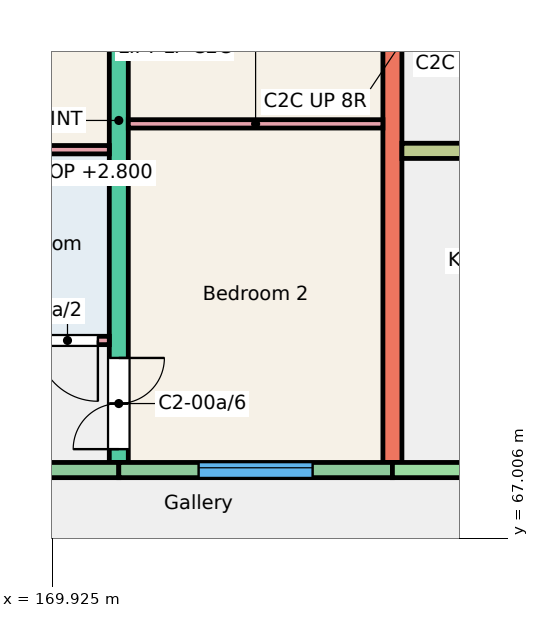
"""IFC4 building model, lengths in metres.
Left out: names, types, materials, properties, quantities, classifications, styles, units other than length and angle.
Written with IfcOpenShell. Run it as: python <this file> out.ifc"""

import sys

from ifc_helpers import new_model, si_unit, direction, frame, frame_2d, origin, place, context, subcontext, project, spatial, rectangle, extrude, element, fill, save


model = new_model("IFC4")
c1 = context("Model", 3, precision=1e-05, world=origin(), true_north=direction((0.0, 1.0)))
c2 = subcontext(c1, "Body", "Model", "MODEL_VIEW")
j1 = project(units=[si_unit("LENGTHUNIT", "METRE"), si_unit("PLANEANGLEUNIT", "RADIAN")], contexts=[c1])
p1 = place(None, origin())
s1 = spatial("IfcSite", under=j1, at=p1, CompositionType="ELEMENT")
p2 = place(p1, origin())
s2 = spatial("IfcBuilding", under=s1, at=p2, CompositionType="ELEMENT")
p3 = place(p2, origin())
s3 = spatial("IfcBuildingStorey", under=s2, at=p3, CompositionType="ELEMENT", Elevation=0.0)
p4 = place(p3, frame((170.8, 68.0, -0.25), z_axis=(0.0, 0.0, 1.0), x_axis=(0.0, 1.0, 0.0)))
e1 = element("IfcWall", 1, at=p4, inside=s3, PredefinedType="SHEAR", context=c2, shape_type="SweptSolid", body=[
    extrude(rectangle(XDim=9.0, YDim=0.25, at=frame_2d((4.5, 0.0))), origin(), (0.0, 0.0, 1.0), 3.25),
])
p5 = place(p4, frame((0.175, 0.0, 0.25)))
e2 = element("IfcOpeningElement", 2, at=p5, cuts=e1, PredefinedType="OPENING", context=c2, shape_type="SweptSolid", body=[
    extrude(rectangle(XDim=1.2, YDim=2.1, at=frame_2d((0.6, 1.05))), frame((0.0, 0.135, 0.0), z_axis=(0.0, -1.0, 0.0), x_axis=(1.0, 0.0, 0.0)), (0.0, 0.0, 1.0), 0.27),
])
p6 = place(p4, frame((6.4, 0.0, 0.25)))
e3 = element("IfcOpeningElement", 3, at=p6, cuts=e1, PredefinedType="OPENING", context=c2, shape_type="SweptSolid", body=[
    extrude(rectangle(XDim=1.2, YDim=2.1, at=frame_2d((0.6, 1.05))), frame((0.0, 0.135, 0.0), z_axis=(0.0, -1.0, 0.0), x_axis=(1.0, 0.0, 0.0)), (0.0, 0.0, 1.0), 0.27),
])
p7 = place(p3, frame((174.4, 68.0, -0.25), z_axis=(0.0, 0.0, 1.0), x_axis=(0.0, 1.0, 0.0)))
e4 = element("IfcWall", 4, at=p7, inside=s3, PredefinedType="SHEAR", context=c2, shape_type="SweptSolid", body=[
    extrude(rectangle(XDim=9.0, YDim=0.25, at=frame_2d((4.5, 0.0))), origin(), (0.0, 0.0, 1.0), 3.25),
])
p8 = place(p3, frame((167.2, 67.9, -0.25), z_axis=(0.0, 0.0, 1.0), x_axis=(1.0, 0.0, 0.0)))
e5 = element("IfcWall", 5, at=p8, inside=s3, PredefinedType="SOLIDWALL", context=c2, shape_type="SweptSolid", body=[
    extrude(rectangle(XDim=3.6, YDim=0.2, at=frame_2d((1.8, 0.0))), origin(), (0.0, 0.0, 1.0), 3.25),
])
p9 = place(p8, frame((1.288, 0.0, 0.25)))
e6 = element("IfcOpeningElement", 6, at=p9, cuts=e5, PredefinedType="OPENING", context=c2, shape_type="SweptSolid", body=[
    extrude(rectangle(XDim=1.0, YDim=2.1, at=frame_2d((0.5, 1.05))), frame((0.0, 0.11, 0.0), z_axis=(0.0, -1.0, 0.0), x_axis=(1.0, 0.0, 0.0)), (0.0, 0.0, 1.0), 0.22),
])
p10 = place(p3, frame((170.8, 67.9, -0.25), z_axis=(0.0, 0.0, 1.0), x_axis=(1.0, 0.0, 0.0)))
e7 = element("IfcWall", 7, at=p10, inside=s3, PredefinedType="SOLIDWALL", context=c2, shape_type="SweptSolid", body=[
    extrude(rectangle(XDim=3.6, YDim=0.2, at=frame_2d((1.8, 0.0))), origin(), (0.0, 0.0, 1.0), 3.25),
])
p11 = place(p10, frame((1.05, 0.0, 1.15)))
e8 = element("IfcOpeningElement", 8, at=p11, cuts=e7, PredefinedType="OPENING", context=c2, shape_type="SweptSolid", body=[
    extrude(rectangle(XDim=1.5, YDim=1.5, at=frame_2d((0.75, 0.75))), frame((0.0, 0.11, 0.0), z_axis=(0.0, -1.0, 0.0), x_axis=(1.0, 0.0, 0.0)), (0.0, 0.0, 1.0), 0.22),
])
p12 = place(p3, frame((174.4, 67.9, -0.25), z_axis=(0.0, 0.0, 1.0), x_axis=(1.0, 0.0, 0.0)))
e9 = element("IfcWall", 9, at=p12, inside=s3, PredefinedType="SHEAR", context=c2, shape_type="SweptSolid", body=[
    extrude(rectangle(XDim=5.85, YDim=0.2, at=frame_2d((2.925, 0.0))), origin(), (0.0, 0.0, 1.0), 3.25),
])
p13 = place(p12, frame((2.438, 0.0, 0.25)))
e10 = element("IfcOpeningElement", 10, at=p13, cuts=e9, PredefinedType="OPENING", context=c2, shape_type="SweptSolid", body=[
    extrude(rectangle(XDim=1.1, YDim=2.1, at=frame_2d((0.55, 1.05))), frame((0.0, 0.11, 0.0), z_axis=(0.0, -1.0, 0.0), x_axis=(1.0, 0.0, 0.0)), (0.0, 0.0, 1.0), 0.22),
])
p14 = place(p3, frame((174.525, 72.1, -0.25), z_axis=(0.0, 0.0, 1.0), x_axis=(1.0, 0.0, 0.0)))
e11 = element("IfcWall", 11, at=p14, inside=s3, PredefinedType="SHEAR", context=c2, shape_type="SweptSolid", body=[
    extrude(rectangle(XDim=5.725, YDim=0.2, at=frame_2d((2.863, 0.0))), origin(), (0.0, 0.0, 1.0), 3.25),
])
p15 = place(p14, frame((0.95, 0.0, 0.25)))
e12 = element("IfcOpeningElement", 12, at=p15, cuts=e11, PredefinedType="OPENING", context=c2, shape_type="SweptSolid", body=[
    extrude(rectangle(XDim=1.0, YDim=2.1, at=frame_2d((0.5, 1.05))), frame((0.0, 0.11, 0.0), z_axis=(0.0, -1.0, 0.0), x_axis=(1.0, 0.0, 0.0)), (0.0, 0.0, 1.0), 0.22),
])
p16 = place(p14, frame((3.863, 0.0, 0.25)))
e13 = element("IfcOpeningElement", 13, at=p16, cuts=e11, PredefinedType="OPENING", context=c2, shape_type="SweptSolid", body=[
    extrude(rectangle(XDim=1.1, YDim=2.1, at=frame_2d((0.55, 1.05))), frame((0.0, 0.11, 0.0), z_axis=(0.0, -1.0, 0.0), x_axis=(1.0, 0.0, 0.0)), (0.0, 0.0, 1.0), 0.22),
])
p17 = place(p3, frame((168.6, 69.605, 0.0), z_axis=(0.0, 0.0, 1.0), x_axis=(1.0, 0.0, 0.0)))
e14 = element("IfcWall", 14, at=p17, inside=s3, PredefinedType="PARTITIONING", context=c2, shape_type="SweptSolid", body=[
    extrude(rectangle(XDim=2.075, YDim=0.11, at=frame_2d((1.038, 0.0))), origin(), (0.0, 0.0, 1.0), 2.8),
])
p18 = place(p17, frame((1.125, 0.0, 0.0)))
e15 = element("IfcOpeningElement", 15, at=p18, cuts=e14, PredefinedType="OPENING", context=c2, shape_type="SweptSolid", body=[
    extrude(rectangle(XDim=0.8, YDim=2.1, at=frame_2d((0.4, 1.05))), frame((0.0, 0.065, 0.0), z_axis=(0.0, -1.0, 0.0), x_axis=(1.0, 0.0, 0.0)), (0.0, 0.0, 1.0), 0.13),
])
p19 = place(p3, frame((167.3, 72.115, 0.0), z_axis=(0.0, 0.0, 1.0), x_axis=(1.0, 0.0, 0.0)))
e16 = element("IfcWall", 16, at=p19, inside=s3, PredefinedType="PARTITIONING", context=c2, shape_type="SweptSolid", body=[
    extrude(rectangle(XDim=3.375, YDim=0.11, at=frame_2d((1.688, 0.0))), origin(), (0.0, 0.0, 1.0), 2.8),
])
p20 = place(p19, frame((0.2, 0.0, 0.0)))
e17 = element("IfcOpeningElement", 17, at=p20, cuts=e16, PredefinedType="OPENING", context=c2, shape_type="SweptSolid", body=[
    extrude(rectangle(XDim=0.9, YDim=2.1, at=frame_2d((0.45, 1.05))), frame((0.0, 0.065, 0.0), z_axis=(0.0, -1.0, 0.0), x_axis=(1.0, 0.0, 0.0)), (0.0, 0.0, 1.0), 0.13),
])
p21 = place(p3, frame((170.925, 72.455, 0.0), z_axis=(0.0, 0.0, 1.0), x_axis=(1.0, 0.0, 0.0)))
e18 = element("IfcWall", 18, at=p21, inside=s3, PredefinedType="PARTITIONING", context=c2, shape_type="SweptSolid", body=[
    extrude(rectangle(XDim=3.35, YDim=0.11, at=frame_2d((1.675, 0.0))), origin(), (0.0, 0.0, 1.0), 2.8),
])
p22 = place(p11, origin())
e19 = element("IfcWindow", 19, at=p22, inside=s3, PartitioningType="SINGLE_PANEL", PredefinedType="WINDOW", context=c2, shape_type="SweptSolid", body=[
    extrude(rectangle(XDim=1.5, YDim=1.5, at=frame_2d((0.75, 0.75))), frame((0.0, 0.06, 0.0), z_axis=(0.0, -1.0, 0.0), x_axis=(1.0, 0.0, 0.0)), (0.0, 0.0, 1.0), 0.06),
])
fill(e8, e19)
p23 = place(p18, origin())
e20 = element("IfcDoor", 20, at=p23, inside=s3, OperationType="SINGLE_SWING_RIGHT", PredefinedType="DOOR", context=c2, shape_type="SweptSolid", body=[
    extrude(rectangle(XDim=0.8, YDim=2.1, at=frame_2d((0.4, 1.05))), frame((0.0, 0.025, 0.0), z_axis=(0.0, -1.0, 0.0), x_axis=(1.0, 0.0, 0.0)), (0.0, 0.0, 1.0), 0.05),
])
fill(e15, e20)
p24 = place(p5, origin())
e21 = element("IfcDoor", 21, at=p24, inside=s3, OperationType="DOUBLE_DOOR_SINGLE_SWING", PredefinedType="DOOR", context=c2, shape_type="SweptSolid", body=[
    extrude(rectangle(XDim=1.2, YDim=2.1, at=frame_2d((0.6, 1.05))), frame((0.0, 0.025, 0.0), z_axis=(0.0, -1.0, 0.0), x_axis=(1.0, 0.0, 0.0)), (0.0, 0.0, 1.0), 0.05),
])
fill(e2, e21)
save(model, sys.argv[1])
